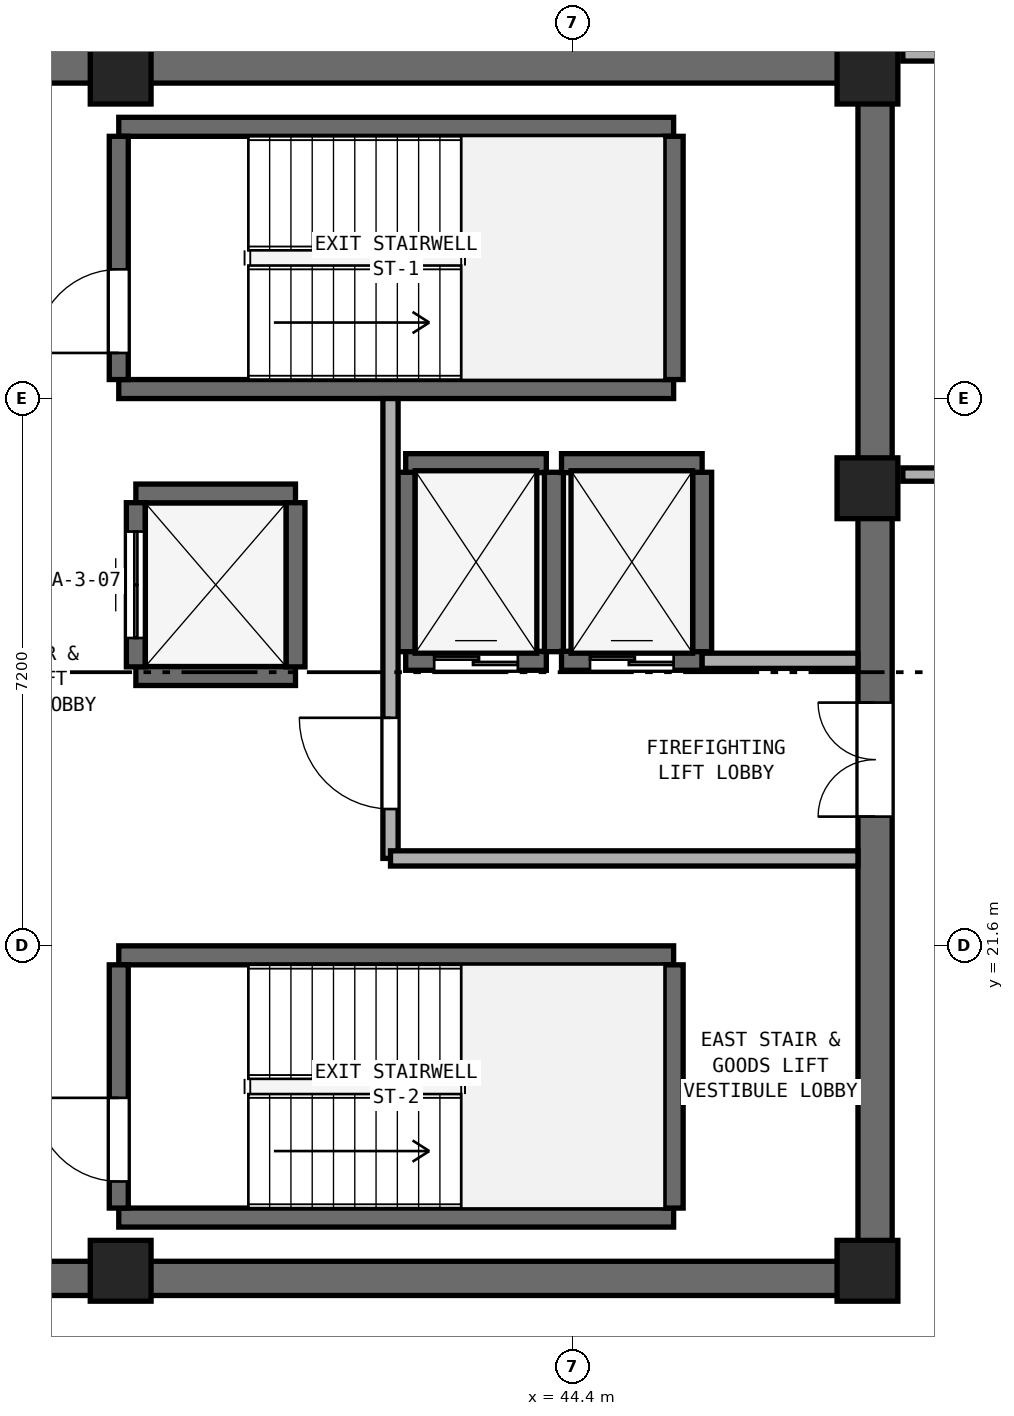
"""IFC4 building model, lengths in metres.
Left out: names, types, materials, properties, quantities, classifications, styles, units other than length and angle.
Written with IfcOpenShell. Run it as: python <this file> out.ifc"""

import sys

from ifc_helpers import new_model, si_unit, direction, frame, frame_2d, origin, origin_2d, place, context, subcontext, project, spatial, rectangle, extrude, element, fill, save


model = new_model("IFC4")
c1 = context("Model", 3, precision=1e-05, world=origin(), true_north=direction((0.0, 1.0)))
c2 = subcontext(c1, "Body", "Model", "MODEL_VIEW")
j1 = project(units=[si_unit("LENGTHUNIT", "METRE"), si_unit("PLANEANGLEUNIT", "RADIAN")], contexts=[c1])
p1 = place(None, origin())
s1 = spatial("IfcSite", under=j1, at=p1, CompositionType="ELEMENT")
p2 = place(p1, origin())
s2 = spatial("IfcBuilding", under=s1, at=p2, CompositionType="ELEMENT")
p3 = place(p2, frame((0.0, 0.0, 236.4)))
s3 = spatial("IfcBuildingStorey", under=s2, at=p3, CompositionType="ELEMENT", Elevation=236.4)
for number, where, z_axis, x_axis in (
    (1, (25.4, 17.225, 0.0), (0.0, 0.0, 1.0), (1.0, 0.0, 0.0)),
    (2, (25.4, 33.175, 0.0), (0.0, 0.0, 1.0), (1.0, 0.0, 0.0)),
):
    element("IfcWall", number, at=place(p3, frame(where, z_axis=z_axis, x_axis=x_axis)), inside=s3, PredefinedType="SHEAR", context=c2, shape_type="SweptSolid", body=[
        extrude(rectangle(XDim=23.2, YDim=0.45, at=frame_2d((11.6, 0.0))), origin(), (0.0, 0.0, 1.0), 3.51),
    ])
p4 = place(p3, frame((48.375, 17.45, 0.0), z_axis=(0.0, 0.0, 1.0), x_axis=(0.0, 1.0, 0.0)))
e3 = element("IfcWall", 3, at=p4, inside=s3, PredefinedType="SHEAR", context=c2, shape_type="SweptSolid", body=[
    extrude(rectangle(XDim=15.5, YDim=0.45, at=frame_2d((7.75, 0.0))), origin(), (0.0, 0.0, 1.0), 3.51),
])
p5 = place(p4, frame((5.85, 0.0, 0.0)))
e4 = element("IfcOpeningElement", 4, at=p5, cuts=e3, PredefinedType="OPENING", context=c2, shape_type="SweptSolid", body=[
    extrude(rectangle(XDim=1.5, YDim=2.15, at=frame_2d((0.75, 1.075))), frame((0.0, 0.235, 0.0), z_axis=(0.0, -1.0, 0.0), x_axis=(1.0, 0.0, 0.0)), (0.0, 0.0, 1.0), 0.47),
])
for number, where, z_axis, x_axis in (
    (5, (38.45, 17.325, 0.0), (0.0, 0.0, 1.0), (1.0, 0.0, 0.0)),
    (6, (48.275, 17.325, 0.0), (0.0, 0.0, 1.0), (1.0, 0.0, 0.0)),
    (7, (48.275, 27.62, 0.0), (0.0, 0.0, 1.0), (1.0, 0.0, 0.0)),
    (8, (48.275, 33.075, 0.0), (0.0, 0.0, 1.0), (1.0, 0.0, 0.0)),
    (9, (38.45, 33.075, 0.0), (0.0, 0.0, 1.0), (1.0, 0.0, 0.0)),
):
    element("IfcColumn", number, at=place(p3, frame(where, z_axis=z_axis, x_axis=x_axis)), inside=s3, PredefinedType="PILASTER", context=c2, shape_type="SweptSolid", body=[
        extrude(rectangle(XDim=0.8, YDim=0.8, at=origin_2d()), origin(), (0.0, 0.0, 1.0), 3.8),
    ])
for number, where, z_axis, x_axis in (
    (10, (38.425, 28.925, 0.0), (0.0, 0.0, 1.0), (1.0, 0.0, 0.0)),
    (11, (38.425, 32.375, 0.0), (0.0, 0.0, 1.0), (1.0, 0.0, 0.0)),
):
    element("IfcWall", number, at=place(p3, frame(where, z_axis=z_axis, x_axis=x_axis)), inside=s3, PredefinedType="SHEAR", context=c2, shape_type="SweptSolid", body=[
        extrude(rectangle(XDim=7.3, YDim=0.25, at=frame_2d((3.65, 0.0))), origin(), (0.0, 0.0, 1.0), 3.51),
    ])
p6 = place(p3, frame((38.425, 29.05, 0.0), z_axis=(0.0, 0.0, 1.0), x_axis=(0.0, 1.0, 0.0)))
e12 = element("IfcWall", 12, at=p6, inside=s3, PredefinedType="SHEAR", context=c2, shape_type="SweptSolid", body=[
    extrude(rectangle(XDim=3.2, YDim=0.25, at=frame_2d((1.6, 0.0))), origin(), (0.0, 0.0, 1.0), 3.51),
])
p7 = place(p6, frame((0.35, 0.0, 0.0)))
e13 = element("IfcOpeningElement", 13, at=p7, cuts=e12, PredefinedType="OPENING", context=c2, shape_type="SweptSolid", body=[
    extrude(rectangle(XDim=1.1, YDim=2.15, at=frame_2d((0.55, 1.075))), frame((0.0, 0.135, 0.0), z_axis=(0.0, -1.0, 0.0), x_axis=(1.0, 0.0, 0.0)), (0.0, 0.0, 1.0), 0.27),
])
p8 = place(p3, frame((45.725, 29.05, 0.0), z_axis=(0.0, 0.0, 1.0), x_axis=(0.0, 1.0, 0.0)))
e14 = element("IfcWall", 14, at=p8, inside=s3, PredefinedType="SHEAR", context=c2, shape_type="SweptSolid", body=[
    extrude(rectangle(XDim=3.2, YDim=0.25, at=frame_2d((1.6, 0.0))), origin(), (0.0, 0.0, 1.0), 3.51),
])
for number, where, z_axis, x_axis in (
    (15, (38.425, 18.025, 0.0), (0.0, 0.0, 1.0), (1.0, 0.0, 0.0)),
    (16, (38.425, 21.475, 0.0), (0.0, 0.0, 1.0), (1.0, 0.0, 0.0)),
):
    element("IfcWall", number, at=place(p3, frame(where, z_axis=z_axis, x_axis=x_axis)), inside=s3, PredefinedType="SHEAR", context=c2, shape_type="SweptSolid", body=[
        extrude(rectangle(XDim=7.3, YDim=0.25, at=frame_2d((3.65, 0.0))), origin(), (0.0, 0.0, 1.0), 3.51),
    ])
p9 = place(p3, frame((38.425, 18.15, 0.0), z_axis=(0.0, 0.0, 1.0), x_axis=(0.0, 1.0, 0.0)))
e17 = element("IfcWall", 17, at=p9, inside=s3, PredefinedType="SHEAR", context=c2, shape_type="SweptSolid", body=[
    extrude(rectangle(XDim=3.2, YDim=0.25, at=frame_2d((1.6, 0.0))), origin(), (0.0, 0.0, 1.0), 3.51),
])
p10 = place(p9, frame((0.35, 0.0, 0.0)))
e18 = element("IfcOpeningElement", 18, at=p10, cuts=e17, PredefinedType="OPENING", context=c2, shape_type="SweptSolid", body=[
    extrude(rectangle(XDim=1.1, YDim=2.15, at=frame_2d((0.55, 1.075))), frame((0.0, 0.135, 0.0), z_axis=(0.0, -1.0, 0.0), x_axis=(1.0, 0.0, 0.0)), (0.0, 0.0, 1.0), 0.27),
])
p11 = place(p3, frame((45.725, 18.15, 0.0), z_axis=(0.0, 0.0, 1.0), x_axis=(0.0, 1.0, 0.0)))
e19 = element("IfcWall", 19, at=p11, inside=s3, PredefinedType="SHEAR", context=c2, shape_type="SweptSolid", body=[
    extrude(rectangle(XDim=3.2, YDim=0.25, at=frame_2d((1.6, 0.0))), origin(), (0.0, 0.0, 1.0), 3.51),
])
p12 = place(p3, frame((42.2, 25.35, 0.0), z_axis=(0.0, 0.0, 1.0), x_axis=(1.0, 0.0, 0.0)))
e20 = element("IfcWall", 20, at=p12, inside=s3, PredefinedType="SHEAR", context=c2, shape_type="SweptSolid", body=[
    extrude(rectangle(XDim=1.85, YDim=0.25, at=frame_2d((0.925, 0.0))), origin(), (0.0, 0.0, 1.0), 3.51),
])
p13 = place(p12, frame((0.375, 0.0, 0.0)))
e21 = element("IfcOpeningElement", 21, at=p13, cuts=e20, PredefinedType="OPENING", context=c2, shape_type="SweptSolid", body=[
    extrude(rectangle(XDim=1.1, YDim=2.15, at=frame_2d((0.55, 1.075))), frame((0.0, 0.135, 0.0), z_axis=(0.0, -1.0, 0.0), x_axis=(1.0, 0.0, 0.0)), (0.0, 0.0, 1.0), 0.27),
])
p14 = place(p3, frame((42.2, 27.95, 0.0), z_axis=(0.0, 0.0, 1.0), x_axis=(1.0, 0.0, 0.0)))
e22 = element("IfcWall", 22, at=p14, inside=s3, PredefinedType="SHEAR", context=c2, shape_type="SweptSolid", body=[
    extrude(rectangle(XDim=1.85, YDim=0.25, at=frame_2d((0.925, 0.0))), origin(), (0.0, 0.0, 1.0), 3.51),
])
for number, where, z_axis, x_axis in (
    (23, (42.2, 25.47, 0.0), (0.0, 0.0, 1.0), (0.0, 1.0, 0.0)),
    (24, (44.15, 25.47, 0.0), (0.0, 0.0, 1.0), (0.0, 1.0, 0.0)),
):
    element("IfcWall", number, at=place(p3, frame(where, z_axis=z_axis, x_axis=x_axis)), inside=s3, PredefinedType="SHEAR", context=c2, shape_type="SweptSolid", body=[
        extrude(rectangle(XDim=2.36, YDim=0.25, at=frame_2d((1.18, 0.0))), origin(), (0.0, 0.0, 1.0), 3.51),
    ])
p15 = place(p3, frame((44.25, 25.35, 0.0), z_axis=(0.0, 0.0, 1.0), x_axis=(1.0, 0.0, 0.0)))
e25 = element("IfcWall", 25, at=p15, inside=s3, PredefinedType="SHEAR", context=c2, shape_type="SweptSolid", body=[
    extrude(rectangle(XDim=1.85, YDim=0.25, at=frame_2d((0.925, 0.0))), origin(), (0.0, 0.0, 1.0), 3.51),
])
p16 = place(p15, frame((0.375, 0.0, 0.0)))
e26 = element("IfcOpeningElement", 26, at=p16, cuts=e25, PredefinedType="OPENING", context=c2, shape_type="SweptSolid", body=[
    extrude(rectangle(XDim=1.1, YDim=2.15, at=frame_2d((0.55, 1.075))), frame((0.0, 0.135, 0.0), z_axis=(0.0, -1.0, 0.0), x_axis=(1.0, 0.0, 0.0)), (0.0, 0.0, 1.0), 0.27),
])
p17 = place(p3, frame((44.25, 27.95, 0.0), z_axis=(0.0, 0.0, 1.0), x_axis=(1.0, 0.0, 0.0)))
e27 = element("IfcWall", 27, at=p17, inside=s3, PredefinedType="SHEAR", context=c2, shape_type="SweptSolid", body=[
    extrude(rectangle(XDim=1.85, YDim=0.25, at=frame_2d((0.925, 0.0))), origin(), (0.0, 0.0, 1.0), 3.51),
])
p18 = place(p3, frame((46.1, 25.47, 0.0), z_axis=(0.0, 0.0, 1.0), x_axis=(0.0, 1.0, 0.0)))
e28 = element("IfcWall", 28, at=p18, inside=s3, PredefinedType="SHEAR", context=c2, shape_type="SweptSolid", body=[
    extrude(rectangle(XDim=2.36, YDim=0.25, at=frame_2d((1.18, 0.0))), origin(), (0.0, 0.0, 1.0), 3.51),
])
for number, where, z_axis, x_axis in (
    (29, (38.65, 25.15, 0.0), (0.0, 0.0, 1.0), (1.0, 0.0, 0.0)),
    (30, (38.65, 27.55, 0.0), (0.0, 0.0, 1.0), (1.0, 0.0, 0.0)),
):
    element("IfcWall", number, at=place(p3, frame(where, z_axis=z_axis, x_axis=x_axis)), inside=s3, PredefinedType="SHEAR", context=c2, shape_type="SweptSolid", body=[
        extrude(rectangle(XDim=2.1, YDim=0.25, at=frame_2d((1.05, 0.0))), origin(), (0.0, 0.0, 1.0), 3.51),
    ])
p19 = place(p3, frame((38.65, 25.27, 0.0), z_axis=(0.0, 0.0, 1.0), x_axis=(0.0, 1.0, 0.0)))
e31 = element("IfcWall", 31, at=p19, inside=s3, PredefinedType="SHEAR", context=c2, shape_type="SweptSolid", body=[
    extrude(rectangle(XDim=2.16, YDim=0.25, at=frame_2d((1.08, 0.0))), origin(), (0.0, 0.0, 1.0), 3.51),
])
p20 = place(p19, frame((0.38, 0.0, 0.0)))
e32 = element("IfcOpeningElement", 32, at=p20, cuts=e31, PredefinedType="OPENING", context=c2, shape_type="SweptSolid", body=[
    extrude(rectangle(XDim=1.4, YDim=2.2, at=frame_2d((0.7, 1.1))), frame((0.0, 0.135, 0.0), z_axis=(0.0, -1.0, 0.0), x_axis=(1.0, 0.0, 0.0)), (0.0, 0.0, 1.0), 0.27),
])
p21 = place(p3, frame((40.75, 25.27, 0.0), z_axis=(0.0, 0.0, 1.0), x_axis=(0.0, 1.0, 0.0)))
e33 = element("IfcWall", 33, at=p21, inside=s3, PredefinedType="SHEAR", context=c2, shape_type="SweptSolid", body=[
    extrude(rectangle(XDim=2.16, YDim=0.25, at=frame_2d((1.08, 0.0))), origin(), (0.0, 0.0, 1.0), 3.51),
])
p22 = place(p3, frame((42.0, 22.75, 0.0), z_axis=(0.0, 0.0, 1.0), x_axis=(0.0, 1.0, 0.0)))
e34 = element("IfcWall", 34, at=p22, inside=s3, PredefinedType="SOLIDWALL", context=c2, shape_type="SweptSolid", body=[
    extrude(rectangle(XDim=6.05, YDim=0.2, at=frame_2d((3.025, 0.0))), origin(), (0.0, 0.0, 1.0), 3.51),
])
p23 = place(p22, frame((0.65, 0.0, 0.0)))
e35 = element("IfcOpeningElement", 35, at=p23, cuts=e34, PredefinedType="OPENING", context=c2, shape_type="SweptSolid", body=[
    extrude(rectangle(XDim=1.2, YDim=2.15, at=frame_2d((0.6, 1.075))), frame((0.0, 0.11, 0.0), z_axis=(0.0, -1.0, 0.0), x_axis=(1.0, 0.0, 0.0)), (0.0, 0.0, 1.0), 0.22),
])
p24 = place(p3, frame((42.0, 22.75, 0.0), z_axis=(0.0, 0.0, 1.0), x_axis=(1.0, 0.0, 0.0)))
e36 = element("IfcWall", 36, at=p24, inside=s3, PredefinedType="SOLIDWALL", context=c2, shape_type="SweptSolid", body=[
    extrude(rectangle(XDim=6.15, YDim=0.2, at=frame_2d((3.075, 0.0))), origin(), (0.0, 0.0, 1.0), 3.51),
])
p25 = place(p3, frame((46.1, 25.35, 0.0), z_axis=(0.0, 0.0, 1.0), x_axis=(1.0, 0.0, 0.0)))
e37 = element("IfcWall", 37, at=p25, inside=s3, PredefinedType="SOLIDWALL", context=c2, shape_type="SweptSolid", body=[
    extrude(rectangle(XDim=2.05, YDim=0.2, at=frame_2d((1.025, 0.0))), origin(), (0.0, 0.0, 1.0), 3.51),
])
p26 = place(p3, frame((48.74, 27.8, 0.0), z_axis=(0.0, 0.0, 1.0), x_axis=(1.0, 0.0, 0.0)))
e38 = element("IfcWall", 38, at=p26, inside=s3, PredefinedType="PARTITIONING", context=c2, shape_type="SweptSolid", body=[
    extrude(rectangle(XDim=3.71, YDim=0.175, at=frame_2d((1.855, 0.0))), origin(), (0.0, 0.0, 1.0), 3.51),
])
p27 = place(p26, frame((1.405, 0.0, 0.0)))
e39 = element("IfcOpeningElement", 39, at=p27, cuts=e38, PredefinedType="OPENING", context=c2, shape_type="SweptSolid", body=[
    extrude(rectangle(XDim=0.9, YDim=2.1, at=frame_2d((0.45, 1.05))), frame((0.0, 0.097, 0.0), z_axis=(0.0, -1.0, 0.0), x_axis=(1.0, 0.0, 0.0)), (0.0, 0.0, 1.0), 0.195),
])
p28 = place(p3, frame((48.74, 33.35, 0.0), z_axis=(0.0, 0.0, 1.0), x_axis=(1.0, 0.0, 0.0)))
e40 = element("IfcWall", 40, at=p28, inside=s3, PredefinedType="PARTITIONING", context=c2, shape_type="SweptSolid", body=[
    extrude(rectangle(XDim=16.555, YDim=0.22, at=frame_2d((8.277, 0.0))), origin(), (0.0, 0.0, 1.0), 2.893),
])
p29 = place(p7, origin())
e41 = element("IfcDoor", 41, at=p29, inside=s3, OperationType="SINGLE_SWING_LEFT", PredefinedType="DOOR", context=c2, shape_type="SweptSolid", body=[
    extrude(rectangle(XDim=1.1, YDim=2.15, at=frame_2d((0.55, 1.075))), frame((0.0, 0.025, 0.0), z_axis=(0.0, -1.0, 0.0), x_axis=(1.0, 0.0, 0.0)), (0.0, 0.0, 1.0), 0.05),
])
fill(e13, e41)
p30 = place(p10, origin())
e42 = element("IfcDoor", 42, at=p30, inside=s3, OperationType="SINGLE_SWING_RIGHT", PredefinedType="DOOR", context=c2, shape_type="SweptSolid", body=[
    extrude(rectangle(XDim=1.1, YDim=2.15, at=frame_2d((0.55, 1.075))), frame((0.0, 0.025, 0.0), z_axis=(0.0, -1.0, 0.0), x_axis=(1.0, 0.0, 0.0)), (0.0, 0.0, 1.0), 0.05),
])
fill(e18, e42)
p31 = place(p13, origin())
e43 = element("IfcDoor", 43, at=p31, inside=s3, OperationType="DOUBLE_DOOR_SLIDING", PredefinedType="DOOR", context=c2, shape_type="SweptSolid", body=[
    extrude(rectangle(XDim=1.1, YDim=2.15, at=frame_2d((0.55, 1.075))), frame((0.0, 0.025, 0.0), z_axis=(0.0, -1.0, 0.0), x_axis=(1.0, 0.0, 0.0)), (0.0, 0.0, 1.0), 0.05),
])
fill(e21, e43)
p32 = place(p16, origin())
e44 = element("IfcDoor", 44, at=p32, inside=s3, OperationType="DOUBLE_DOOR_SLIDING", PredefinedType="DOOR", context=c2, shape_type="SweptSolid", body=[
    extrude(rectangle(XDim=1.1, YDim=2.15, at=frame_2d((0.55, 1.075))), frame((0.0, 0.025, 0.0), z_axis=(0.0, -1.0, 0.0), x_axis=(1.0, 0.0, 0.0)), (0.0, 0.0, 1.0), 0.05),
])
fill(e26, e44)
p33 = place(p20, origin())
e45 = element("IfcDoor", 45, at=p33, inside=s3, OperationType="DOUBLE_DOOR_SLIDING", PredefinedType="DOOR", context=c2, shape_type="SweptSolid", body=[
    extrude(rectangle(XDim=1.4, YDim=2.2, at=frame_2d((0.7, 1.1))), frame((0.0, 0.025, 0.0), z_axis=(0.0, -1.0, 0.0), x_axis=(1.0, 0.0, 0.0)), (0.0, 0.0, 1.0), 0.05),
])
fill(e32, e45)
p34 = place(p23, origin())
e46 = element("IfcDoor", 46, at=p34, inside=s3, OperationType="SINGLE_SWING_RIGHT", PredefinedType="DOOR", context=c2, shape_type="SweptSolid", body=[
    extrude(rectangle(XDim=1.2, YDim=2.15, at=frame_2d((0.6, 1.075))), frame((0.0, 0.025, 0.0), z_axis=(0.0, -1.0, 0.0), x_axis=(1.0, 0.0, 0.0)), (0.0, 0.0, 1.0), 0.05),
])
fill(e35, e46)
p35 = place(p5, origin())
e47 = element("IfcDoor", 47, at=p35, inside=s3, OperationType="DOUBLE_DOOR_SINGLE_SWING", PredefinedType="DOOR", context=c2, shape_type="SweptSolid", body=[
    extrude(rectangle(XDim=1.5, YDim=2.15, at=frame_2d((0.75, 1.075))), frame((0.0, 0.025, 0.0), z_axis=(0.0, -1.0, 0.0), x_axis=(1.0, 0.0, 0.0)), (0.0, 0.0, 1.0), 0.05),
])
fill(e4, e47)
save(model, sys.argv[1])
